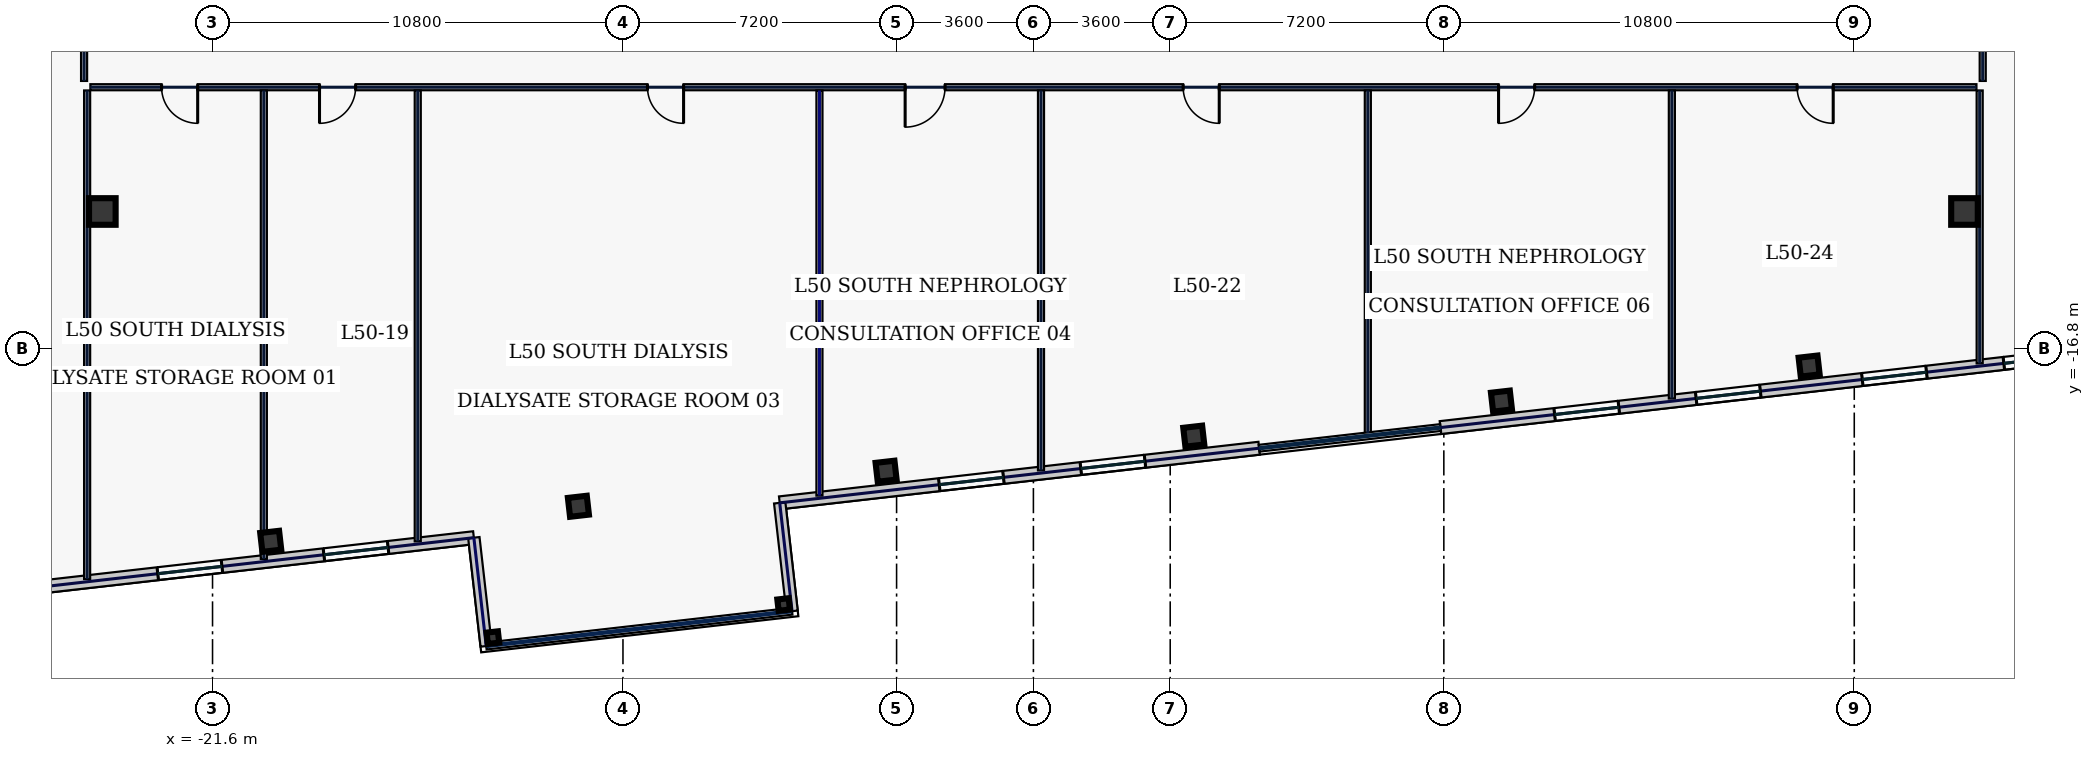
"""IFC4 building model, lengths in metres.
Left out: names, types, materials, properties, quantities, classifications, styles, units other than length and angle.
Written with IfcOpenShell. Run it as: python <this file> out.ifc"""

import sys

from ifc_helpers import new_model, si_unit, direction, frame, frame_2d, origin, origin_2d, place, context, subcontext, project, spatial, rectangle, hollow_rectangle, extrude, element, fill, save


model = new_model("IFC4")
c1 = context("Model", 3, precision=1e-05, world=origin(), true_north=direction((0.0, 1.0)))
c2 = subcontext(c1, "Body", "Model", "MODEL_VIEW")
j1 = project(units=[si_unit("LENGTHUNIT", "METRE"), si_unit("PLANEANGLEUNIT", "RADIAN")], contexts=[c1])
p1 = place(None, origin())
s1 = spatial("IfcSite", under=j1, at=p1, CompositionType="ELEMENT")
p2 = place(p1, origin())
s2 = spatial("IfcBuilding", under=s1, at=p2, CompositionType="ELEMENT")
p3 = place(p2, frame((0.0, 0.0, 218.2)))
s3 = spatial("IfcBuildingStorey", under=s2, at=p3, CompositionType="ELEMENT", Elevation=218.2)
for number, where, z_axis, x_axis in (
    (1, (-24.5, -13.2, 0.0), (0.0, 0.0, 1.0), (1.0, 0.0, 0.0)),
    (2, (24.5, -13.2, 0.0), (0.0, 0.0, 1.0), (1.0, 0.0, 0.0)),
):
    element("IfcColumn", number, at=place(p3, frame(where, z_axis=z_axis, x_axis=x_axis)), inside=s3, PredefinedType="COLUMN", context=c2, shape_type="SweptSolid", body=[
        extrude(hollow_rectangle(XDim=0.7, YDim=0.7, WallThickness=0.032, at=origin_2d()), origin(), (0.0, 0.0, 1.0), 3.74),
    ])
for number, where, z_axis, x_axis in (
    (3, (-20.069, -21.88, 0.0), (0.0, 0.0, 1.0), (0.994, 0.113, 0.0)),
    (4, (-11.972, -20.958, 0.0), (0.0, 0.0, 1.0), (0.994, 0.113, 0.0)),
    (5, (-3.876, -20.035, 0.0), (0.0, 0.0, 1.0), (0.994, 0.113, 0.0)),
    (6, (4.22, -19.113, 0.0), (0.0, 0.0, 1.0), (0.994, 0.113, 0.0)),
    (7, (12.316, -18.19, 0.0), (0.0, 0.0, 1.0), (0.994, 0.113, 0.0)),
    (8, (20.412, -17.268, 0.0), (0.0, 0.0, 1.0), (0.994, 0.113, 0.0)),
):
    element("IfcColumn", number, at=place(p3, frame(where, z_axis=z_axis, x_axis=x_axis)), inside=s3, PredefinedType="COLUMN", context=c2, shape_type="SweptSolid", body=[
        extrude(hollow_rectangle(XDim=0.5, YDim=0.5, WallThickness=0.025, at=origin_2d()), origin(), (0.0, 0.0, 1.0), 3.74),
    ])
for number, where, z_axis, x_axis in (
    (9, (-14.223, -24.415, 0.0), (0.0, 0.0, 1.0), (0.994, 0.113, 0.0)),
    (10, (-6.572, -23.543, 0.0), (0.0, 0.0, 1.0), (0.994, 0.113, 0.0)),
):
    element("IfcColumn", number, at=place(p3, frame(where, z_axis=z_axis, x_axis=x_axis)), inside=s3, PredefinedType="COLUMN", context=c2, shape_type="SweptSolid", body=[
        extrude(hollow_rectangle(XDim=0.3, YDim=0.3, WallThickness=0.016, at=origin_2d()), origin(), (0.0, 0.0, 1.0), 3.74),
    ])
p4 = place(p3, frame((-28.783, -23.386, 0.0), z_axis=(0.0, 0.0, 1.0), x_axis=(0.993572262951, 0.113199639106, 0.0)))
e11 = element("IfcWall", 11, at=p4, inside=s3, PredefinedType="STANDARD", context=c2, shape_type="SweptSolid", body=[
    extrude(rectangle(XDim=14.15, YDim=0.34, at=frame_2d((7.075, 0.0))), origin(), (0.0, 0.0, 1.0), 3.74),
])
p5 = place(p4, frame((2.03, 0.0, 0.88)))
e12 = element("IfcOpeningElement", 12, at=p5, cuts=e11, PredefinedType="OPENING", context=c2, shape_type="SweptSolid", body=[
    extrude(rectangle(XDim=0.85, YDim=1.85, at=frame_2d((0.425, 0.925))), frame((0.0, 0.18, 0.0), z_axis=(0.0, -1.0, 0.0), x_axis=(1.0, 0.0, 0.0)), (0.0, 0.0, 1.0), 0.36),
])
p6 = place(p4, frame((5.779, 0.0, 0.88)))
e13 = element("IfcOpeningElement", 13, at=p6, cuts=e11, PredefinedType="OPENING", context=c2, shape_type="SweptSolid", body=[
    extrude(rectangle(XDim=1.7, YDim=1.95, at=frame_2d((0.85, 0.975))), frame((0.0, 0.18, 0.0), z_axis=(0.0, -1.0, 0.0), x_axis=(1.0, 0.0, 0.0)), (0.0, 0.0, 1.0), 0.36),
])
p7 = place(p4, frame((10.179, 0.0, 0.88)))
e14 = element("IfcOpeningElement", 14, at=p7, cuts=e11, PredefinedType="OPENING", context=c2, shape_type="SweptSolid", body=[
    extrude(rectangle(XDim=1.7, YDim=1.95, at=frame_2d((0.85, 0.975))), frame((0.0, 0.18, 0.0), z_axis=(0.0, -1.0, 0.0), x_axis=(1.0, 0.0, 0.0)), (0.0, 0.0, 1.0), 0.36),
])
p8 = place(p3, frame((-6.676, -20.867, 0.0), z_axis=(0.0, 0.0, 1.0), x_axis=(0.993572024997, 0.113201727649, 0.0)))
e15 = element("IfcWall", 15, at=p8, inside=s3, PredefinedType="STANDARD", context=c2, shape_type="SweptSolid", body=[
    extrude(rectangle(XDim=12.698, YDim=0.34, at=frame_2d((6.349, 0.0))), origin(), (0.0, 0.0, 1.0), 3.74),
])
p9 = place(p8, frame((4.226, 0.0, 0.88)))
e16 = element("IfcOpeningElement", 16, at=p9, cuts=e15, PredefinedType="OPENING", context=c2, shape_type="SweptSolid", body=[
    extrude(rectangle(XDim=1.7, YDim=1.95, at=frame_2d((0.85, 0.975))), frame((0.0, 0.18, 0.0), z_axis=(0.0, -1.0, 0.0), x_axis=(1.0, 0.0, 0.0)), (0.0, 0.0, 1.0), 0.36),
])
p10 = place(p8, frame((7.974, 0.0, 0.88)))
e17 = element("IfcOpeningElement", 17, at=p10, cuts=e15, PredefinedType="OPENING", context=c2, shape_type="SweptSolid", body=[
    extrude(rectangle(XDim=1.7, YDim=1.95, at=frame_2d((0.85, 0.975))), frame((0.0, 0.18, 0.0), z_axis=(0.0, -1.0, 0.0), x_axis=(1.0, 0.0, 0.0)), (0.0, 0.0, 1.0), 0.36),
])
p11 = place(p3, frame((10.71, -18.886, 0.0), z_axis=(0.0, 0.0, 1.0), x_axis=(0.993572271362, 0.113199565282, 0.0)))
e18 = element("IfcWall", 18, at=p11, inside=s3, PredefinedType="STANDARD", context=c2, shape_type="SweptSolid", body=[
    extrude(rectangle(XDim=18.651, YDim=0.34, at=frame_2d((9.326, 0.0))), origin(), (0.0, 0.0, 1.0), 3.74),
])
p12 = place(p11, frame((3.024, 0.0, 0.88)))
e19 = element("IfcOpeningElement", 19, at=p12, cuts=e18, PredefinedType="OPENING", context=c2, shape_type="SweptSolid", body=[
    extrude(rectangle(XDim=1.7, YDim=1.95, at=frame_2d((0.85, 0.975))), frame((0.0, 0.18, 0.0), z_axis=(0.0, -1.0, 0.0), x_axis=(1.0, 0.0, 0.0)), (0.0, 0.0, 1.0), 0.36),
])
p13 = place(p11, frame((6.773, 0.0, 0.88)))
e20 = element("IfcOpeningElement", 20, at=p13, cuts=e18, PredefinedType="OPENING", context=c2, shape_type="SweptSolid", body=[
    extrude(rectangle(XDim=1.7, YDim=1.95, at=frame_2d((0.85, 0.975))), frame((0.0, 0.18, 0.0), z_axis=(0.0, -1.0, 0.0), x_axis=(1.0, 0.0, 0.0)), (0.0, 0.0, 1.0), 0.36),
])
p14 = place(p11, frame((11.173, 0.0, 0.88)))
e21 = element("IfcOpeningElement", 21, at=p14, cuts=e18, PredefinedType="OPENING", context=c2, shape_type="SweptSolid", body=[
    extrude(rectangle(XDim=1.7, YDim=1.95, at=frame_2d((0.85, 0.975))), frame((0.0, 0.18, 0.0), z_axis=(0.0, -1.0, 0.0), x_axis=(1.0, 0.0, 0.0)), (0.0, 0.0, 1.0), 0.36),
])
p15 = place(p11, frame((14.921, 0.0, 0.88)))
e22 = element("IfcOpeningElement", 22, at=p15, cuts=e18, PredefinedType="OPENING", context=c2, shape_type="SweptSolid", body=[
    extrude(rectangle(XDim=1.7, YDim=1.95, at=frame_2d((0.85, 0.975))), frame((0.0, 0.18, 0.0), z_axis=(0.0, -1.0, 0.0), x_axis=(1.0, 0.0, 0.0)), (0.0, 0.0, 1.0), 0.36),
])
p16 = place(p3, frame((-14.724, -21.784, 0.0), z_axis=(0.0, 0.0, 1.0), x_axis=(0.113222704107, -0.993569634839, 0.0)))
e23 = element("IfcWall", 23, at=p16, inside=s3, PredefinedType="STANDARD", context=c2, shape_type="SweptSolid", body=[
    extrude(rectangle(XDim=2.87, YDim=0.3, at=frame_2d((1.435, 0.0))), origin(), (0.0, 0.0, 1.0), 3.74),
])
p17 = place(p3, frame((-6.676, -20.867, 0.0), z_axis=(0.0, 0.0, 1.0), x_axis=(0.113138727493, -0.99357920084, 0.0)))
e24 = element("IfcWall", 24, at=p17, inside=s3, PredefinedType="STANDARD", context=c2, shape_type="SweptSolid", body=[
    extrude(rectangle(XDim=2.87, YDim=0.3, at=frame_2d((1.435, 0.0))), origin(), (0.0, 0.0, 1.0), 1.535),
])
p18 = place(p3, frame((-24.98, -9.765, 0.0), z_axis=(0.0, 0.0, 1.0), x_axis=(0.0, 1.0, 0.0)))
e25 = element("IfcWall", 25, at=p18, inside=s3, PredefinedType="PARTITIONING", context=c2, shape_type="SweptSolid", body=[
    extrude(rectangle(XDim=2.98, YDim=0.16, at=frame_2d((1.49, 0.0))), origin(), (0.0, 0.0, 1.0), 3.74),
])
p19 = place(p18, frame((1.1, 0.0, 0.0)))
e26 = element("IfcOpeningElement", 26, at=p19, cuts=e25, PredefinedType="OPENING", context=c2, shape_type="SweptSolid", body=[
    extrude(rectangle(XDim=0.95, YDim=2.2, at=frame_2d((0.475, 1.1))), frame((0.0, 0.09, 0.0), z_axis=(0.0, -1.0, 0.0), x_axis=(1.0, 0.0, 0.0)), (0.0, 0.0, 1.0), 0.18),
])
p20 = place(p3, frame((24.98, -6.785, 0.0), z_axis=(0.0, 0.0, 1.0), x_axis=(0.0, -1.0, 0.0)))
e27 = element("IfcWall", 27, at=p20, inside=s3, PredefinedType="PARTITIONING", context=c2, shape_type="SweptSolid", body=[
    extrude(rectangle(XDim=2.98, YDim=0.16, at=frame_2d((1.49, 0.0))), origin(), (0.0, 0.0, 1.0), 3.74),
])
p21 = place(p20, frame((1.1, 0.0, 0.0)))
e28 = element("IfcOpeningElement", 28, at=p21, cuts=e27, PredefinedType="OPENING", context=c2, shape_type="SweptSolid", body=[
    extrude(rectangle(XDim=0.95, YDim=2.2, at=frame_2d((0.475, 1.1))), frame((0.0, 0.09, 0.0), z_axis=(0.0, -1.0, 0.0), x_axis=(1.0, 0.0, 0.0)), (0.0, 0.0, 1.0), 0.18),
])
p22 = place(p3, frame((24.815, -9.93, 0.0), z_axis=(0.0, 0.0, 1.0), x_axis=(-1.0, 0.0, 0.0)))
e29 = element("IfcWall", 29, at=p22, inside=s3, PredefinedType="PARTITIONING", context=c2, shape_type="SweptSolid", body=[
    extrude(rectangle(XDim=49.63, YDim=0.16, at=frame_2d((24.815, 0.0))), origin(), (0.0, 0.0, 1.0), 3.74),
])
p23 = place(p22, frame((46.806, 0.0, 0.0)))
e30 = element("IfcOpeningElement", 30, at=p23, cuts=e29, PredefinedType="OPENING", context=c2, shape_type="SweptSolid", body=[
    extrude(rectangle(XDim=0.95, YDim=2.2, at=frame_2d((0.475, 1.1))), frame((0.0, 0.09, 0.0), z_axis=(0.0, -1.0, 0.0), x_axis=(1.0, 0.0, 0.0)), (0.0, 0.0, 1.0), 0.18),
])
p24 = place(p22, frame((42.65, 0.0, 0.0)))
e31 = element("IfcOpeningElement", 31, at=p24, cuts=e29, PredefinedType="OPENING", context=c2, shape_type="SweptSolid", body=[
    extrude(rectangle(XDim=0.95, YDim=2.2, at=frame_2d((0.475, 1.1))), frame((0.0, 0.09, 0.0), z_axis=(0.0, -1.0, 0.0), x_axis=(1.0, 0.0, 0.0)), (0.0, 0.0, 1.0), 0.18),
])
p25 = place(p22, frame((34.02, 0.0, 0.0)))
e32 = element("IfcOpeningElement", 32, at=p25, cuts=e29, PredefinedType="OPENING", context=c2, shape_type="SweptSolid", body=[
    extrude(rectangle(XDim=0.95, YDim=2.2, at=frame_2d((0.475, 1.1))), frame((0.0, 0.09, 0.0), z_axis=(0.0, -1.0, 0.0), x_axis=(1.0, 0.0, 0.0)), (0.0, 0.0, 1.0), 0.18),
])
p26 = place(p22, frame((27.14, 0.0, 0.0)))
e33 = element("IfcOpeningElement", 33, at=p26, cuts=e29, PredefinedType="OPENING", context=c2, shape_type="SweptSolid", body=[
    extrude(rectangle(XDim=1.05, YDim=2.2, at=frame_2d((0.525, 1.1))), frame((0.0, 0.09, 0.0), z_axis=(0.0, -1.0, 0.0), x_axis=(1.0, 0.0, 0.0)), (0.0, 0.0, 1.0), 0.18),
])
p27 = place(p22, frame((19.925, 0.0, 0.0)))
e34 = element("IfcOpeningElement", 34, at=p27, cuts=e29, PredefinedType="OPENING", context=c2, shape_type="SweptSolid", body=[
    extrude(rectangle(XDim=0.95, YDim=2.2, at=frame_2d((0.475, 1.1))), frame((0.0, 0.09, 0.0), z_axis=(0.0, -1.0, 0.0), x_axis=(1.0, 0.0, 0.0)), (0.0, 0.0, 1.0), 0.18),
])
p28 = place(p22, frame((11.625, 0.0, 0.0)))
e35 = element("IfcOpeningElement", 35, at=p28, cuts=e29, PredefinedType="OPENING", context=c2, shape_type="SweptSolid", body=[
    extrude(rectangle(XDim=0.95, YDim=2.2, at=frame_2d((0.475, 1.1))), frame((0.0, 0.09, 0.0), z_axis=(0.0, -1.0, 0.0), x_axis=(1.0, 0.0, 0.0)), (0.0, 0.0, 1.0), 0.18),
])
p29 = place(p22, frame((3.769, 0.0, 0.0)))
e36 = element("IfcOpeningElement", 36, at=p29, cuts=e29, PredefinedType="OPENING", context=c2, shape_type="SweptSolid", body=[
    extrude(rectangle(XDim=0.95, YDim=2.2, at=frame_2d((0.475, 1.1))), frame((0.0, 0.09, 0.0), z_axis=(0.0, -1.0, 0.0), x_axis=(1.0, 0.0, 0.0)), (0.0, 0.0, 1.0), 0.18),
])
p30 = place(p3, frame((-24.9, -22.873, 0.0), z_axis=(0.0, 0.0, 1.0), x_axis=(0.0, 1.0, 0.0)))
e37 = element("IfcWall", 37, at=p30, inside=s3, PredefinedType="PARTITIONING", context=c2, shape_type="SweptSolid", body=[
    extrude(rectangle(XDim=12.858, YDim=0.16, at=frame_2d((6.429, 0.0))), origin(), (0.0, 0.0, 1.0), 3.74),
])
p31 = place(p3, frame((24.9, -17.199, 0.0), z_axis=(0.0, 0.0, 1.0), x_axis=(0.0, 1.0, 0.0)))
e38 = element("IfcWall", 38, at=p31, inside=s3, PredefinedType="PARTITIONING", context=c2, shape_type="SweptSolid", body=[
    extrude(rectangle(XDim=7.185, YDim=0.16, at=frame_2d((3.592, 0.0))), origin(), (0.0, 0.0, 1.0), 3.74),
])
p32 = place(p3, frame((-20.25, -22.344, 0.0), z_axis=(0.0, 0.0, 1.0), x_axis=(0.0, 1.0, 0.0)))
e39 = element("IfcWall", 39, at=p32, inside=s3, PredefinedType="PARTITIONING", context=c2, shape_type="SweptSolid", body=[
    extrude(rectangle(XDim=12.329, YDim=0.16, at=frame_2d((6.164, 0.0))), origin(), (0.0, 0.0, 1.0), 3.74),
])
p33 = place(p3, frame((-16.2, -21.882, 0.0), z_axis=(0.0, 0.0, 1.0), x_axis=(0.0, 1.0, 0.0)))
e40 = element("IfcWall", 40, at=p33, inside=s3, PredefinedType="PARTITIONING", context=c2, shape_type="SweptSolid", body=[
    extrude(rectangle(XDim=11.867, YDim=0.16, at=frame_2d((5.934, 0.0))), origin(), (0.0, 0.0, 1.0), 3.74),
])
p34 = place(p3, frame((-5.63, -20.678, 0.0), z_axis=(0.0, 0.0, 1.0), x_axis=(0.0, 1.0, 0.0)))
e41 = element("IfcWall", 41, at=p34, inside=s3, PredefinedType="PARTITIONING", context=c2, shape_type="SweptSolid", body=[
    extrude(rectangle(XDim=10.663, YDim=0.16, at=frame_2d((5.332, 0.0))), origin(), (0.0, 0.0, 1.0), 1.535),
])
p35 = place(p3, frame((0.2, -20.014, 0.0), z_axis=(0.0, 0.0, 1.0), x_axis=(0.0, 1.0, 0.0)))
e42 = element("IfcWall", 42, at=p35, inside=s3, PredefinedType="PARTITIONING", context=c2, shape_type="SweptSolid", body=[
    extrude(rectangle(XDim=9.999, YDim=0.16, at=frame_2d((5.0, 0.0))), origin(), (0.0, 0.0, 1.0), 3.74),
])
p36 = place(p3, frame((8.8, -19.034, 0.0), z_axis=(0.0, 0.0, 1.0), x_axis=(0.0, 1.0, 0.0)))
e43 = element("IfcWall", 43, at=p36, inside=s3, PredefinedType="PARTITIONING", context=c2, shape_type="SweptSolid", body=[
    extrude(rectangle(XDim=9.019, YDim=0.16, at=frame_2d((4.509, 0.0))), origin(), (0.0, 0.0, 1.0), 3.74),
])
p37 = place(p3, frame((16.8, -18.122, 0.0), z_axis=(0.0, 0.0, 1.0), x_axis=(0.0, 1.0, 0.0)))
e44 = element("IfcWall", 44, at=p37, inside=s3, PredefinedType="PARTITIONING", context=c2, shape_type="SweptSolid", body=[
    extrude(rectangle(XDim=8.107, YDim=0.16, at=frame_2d((4.054, 0.0))), origin(), (0.0, 0.0, 1.0), 3.74),
])
p38 = place(p6, origin())
e45 = element("IfcWindow", 45, at=p38, inside=s3, PartitioningType="SINGLE_PANEL", PredefinedType="WINDOW", context=c2, shape_type="SweptSolid", body=[
    extrude(rectangle(XDim=1.7, YDim=1.95, at=frame_2d((0.85, 0.975))), frame((0.0, 0.03, 0.0), z_axis=(0.0, -1.0, 0.0), x_axis=(1.0, 0.0, 0.0)), (0.0, 0.0, 1.0), 0.06),
])
fill(e13, e45)
p39 = place(p7, origin())
e46 = element("IfcWindow", 46, at=p39, inside=s3, PartitioningType="SINGLE_PANEL", PredefinedType="WINDOW", context=c2, shape_type="SweptSolid", body=[
    extrude(rectangle(XDim=1.7, YDim=1.95, at=frame_2d((0.85, 0.975))), frame((0.0, 0.03, 0.0), z_axis=(0.0, -1.0, 0.0), x_axis=(1.0, 0.0, 0.0)), (0.0, 0.0, 1.0), 0.06),
])
fill(e14, e46)
p40 = place(p9, origin())
e47 = element("IfcWindow", 47, at=p40, inside=s3, PartitioningType="SINGLE_PANEL", PredefinedType="WINDOW", context=c2, shape_type="SweptSolid", body=[
    extrude(rectangle(XDim=1.7, YDim=1.95, at=frame_2d((0.85, 0.975))), frame((0.0, 0.03, 0.0), z_axis=(0.0, -1.0, 0.0), x_axis=(1.0, 0.0, 0.0)), (0.0, 0.0, 1.0), 0.06),
])
fill(e16, e47)
p41 = place(p10, origin())
e48 = element("IfcWindow", 48, at=p41, inside=s3, PartitioningType="SINGLE_PANEL", PredefinedType="WINDOW", context=c2, shape_type="SweptSolid", body=[
    extrude(rectangle(XDim=1.7, YDim=1.95, at=frame_2d((0.85, 0.975))), frame((0.0, 0.03, 0.0), z_axis=(0.0, -1.0, 0.0), x_axis=(1.0, 0.0, 0.0)), (0.0, 0.0, 1.0), 0.06),
])
fill(e17, e48)
p42 = place(p12, origin())
e49 = element("IfcWindow", 49, at=p42, inside=s3, PartitioningType="SINGLE_PANEL", PredefinedType="WINDOW", context=c2, shape_type="SweptSolid", body=[
    extrude(rectangle(XDim=1.7, YDim=1.95, at=frame_2d((0.85, 0.975))), frame((0.0, 0.03, 0.0), z_axis=(0.0, -1.0, 0.0), x_axis=(1.0, 0.0, 0.0)), (0.0, 0.0, 1.0), 0.06),
])
fill(e19, e49)
p43 = place(p13, origin())
e50 = element("IfcWindow", 50, at=p43, inside=s3, PartitioningType="SINGLE_PANEL", PredefinedType="WINDOW", context=c2, shape_type="SweptSolid", body=[
    extrude(rectangle(XDim=1.7, YDim=1.95, at=frame_2d((0.85, 0.975))), frame((0.0, 0.03, 0.0), z_axis=(0.0, -1.0, 0.0), x_axis=(1.0, 0.0, 0.0)), (0.0, 0.0, 1.0), 0.06),
])
fill(e20, e50)
p44 = place(p14, origin())
e51 = element("IfcWindow", 51, at=p44, inside=s3, PartitioningType="SINGLE_PANEL", PredefinedType="WINDOW", context=c2, shape_type="SweptSolid", body=[
    extrude(rectangle(XDim=1.7, YDim=1.95, at=frame_2d((0.85, 0.975))), frame((0.0, 0.03, 0.0), z_axis=(0.0, -1.0, 0.0), x_axis=(1.0, 0.0, 0.0)), (0.0, 0.0, 1.0), 0.06),
])
fill(e21, e51)
p45 = place(p15, origin())
e52 = element("IfcWindow", 52, at=p45, inside=s3, PartitioningType="SINGLE_PANEL", PredefinedType="WINDOW", context=c2, shape_type="SweptSolid", body=[
    extrude(rectangle(XDim=1.7, YDim=1.95, at=frame_2d((0.85, 0.975))), frame((0.0, 0.03, 0.0), z_axis=(0.0, -1.0, 0.0), x_axis=(1.0, 0.0, 0.0)), (0.0, 0.0, 1.0), 0.06),
])
fill(e22, e52)
p46 = place(p23, origin())
e53 = element("IfcDoor", 53, at=p46, inside=s3, OperationType="SINGLE_SWING_LEFT", PredefinedType="DOOR", context=c2, shape_type="SweptSolid", body=[
    extrude(rectangle(XDim=0.95, YDim=2.2, at=frame_2d((0.475, 1.1))), frame((0.0, 0.025, 0.0), z_axis=(0.0, -1.0, 0.0), x_axis=(1.0, 0.0, 0.0)), (0.0, 0.0, 1.0), 0.05),
])
fill(e30, e53)
p47 = place(p24, origin())
e54 = element("IfcDoor", 54, at=p47, inside=s3, OperationType="SINGLE_SWING_RIGHT", PredefinedType="DOOR", context=c2, shape_type="SweptSolid", body=[
    extrude(rectangle(XDim=0.95, YDim=2.2, at=frame_2d((0.475, 1.1))), frame((0.0, 0.025, 0.0), z_axis=(0.0, -1.0, 0.0), x_axis=(1.0, 0.0, 0.0)), (0.0, 0.0, 1.0), 0.05),
])
fill(e31, e54)
p48 = place(p25, origin())
e55 = element("IfcDoor", 55, at=p48, inside=s3, OperationType="SINGLE_SWING_LEFT", PredefinedType="DOOR", context=c2, shape_type="SweptSolid", body=[
    extrude(rectangle(XDim=0.95, YDim=2.2, at=frame_2d((0.475, 1.1))), frame((0.0, 0.025, 0.0), z_axis=(0.0, -1.0, 0.0), x_axis=(1.0, 0.0, 0.0)), (0.0, 0.0, 1.0), 0.05),
])
fill(e32, e55)
p49 = place(p26, origin())
e56 = element("IfcDoor", 56, at=p49, inside=s3, OperationType="SINGLE_SWING_RIGHT", PredefinedType="DOOR", context=c2, shape_type="SweptSolid", body=[
    extrude(rectangle(XDim=1.05, YDim=2.2, at=frame_2d((0.525, 1.1))), frame((0.0, 0.025, 0.0), z_axis=(0.0, -1.0, 0.0), x_axis=(1.0, 0.0, 0.0)), (0.0, 0.0, 1.0), 0.05),
])
fill(e33, e56)
p50 = place(p27, origin())
e57 = element("IfcDoor", 57, at=p50, inside=s3, OperationType="SINGLE_SWING_LEFT", PredefinedType="DOOR", context=c2, shape_type="SweptSolid", body=[
    extrude(rectangle(XDim=0.95, YDim=2.2, at=frame_2d((0.475, 1.1))), frame((0.0, 0.025, 0.0), z_axis=(0.0, -1.0, 0.0), x_axis=(1.0, 0.0, 0.0)), (0.0, 0.0, 1.0), 0.05),
])
fill(e34, e57)
p51 = place(p28, origin())
e58 = element("IfcDoor", 58, at=p51, inside=s3, OperationType="SINGLE_SWING_RIGHT", PredefinedType="DOOR", context=c2, shape_type="SweptSolid", body=[
    extrude(rectangle(XDim=0.95, YDim=2.2, at=frame_2d((0.475, 1.1))), frame((0.0, 0.025, 0.0), z_axis=(0.0, -1.0, 0.0), x_axis=(1.0, 0.0, 0.0)), (0.0, 0.0, 1.0), 0.05),
])
fill(e35, e58)
p52 = place(p29, origin())
e59 = element("IfcDoor", 59, at=p52, inside=s3, OperationType="SINGLE_SWING_LEFT", PredefinedType="DOOR", context=c2, shape_type="SweptSolid", body=[
    extrude(rectangle(XDim=0.95, YDim=2.2, at=frame_2d((0.475, 1.1))), frame((0.0, 0.025, 0.0), z_axis=(0.0, -1.0, 0.0), x_axis=(1.0, 0.0, 0.0)), (0.0, 0.0, 1.0), 0.05),
])
fill(e36, e59)
save(model, sys.argv[1])
